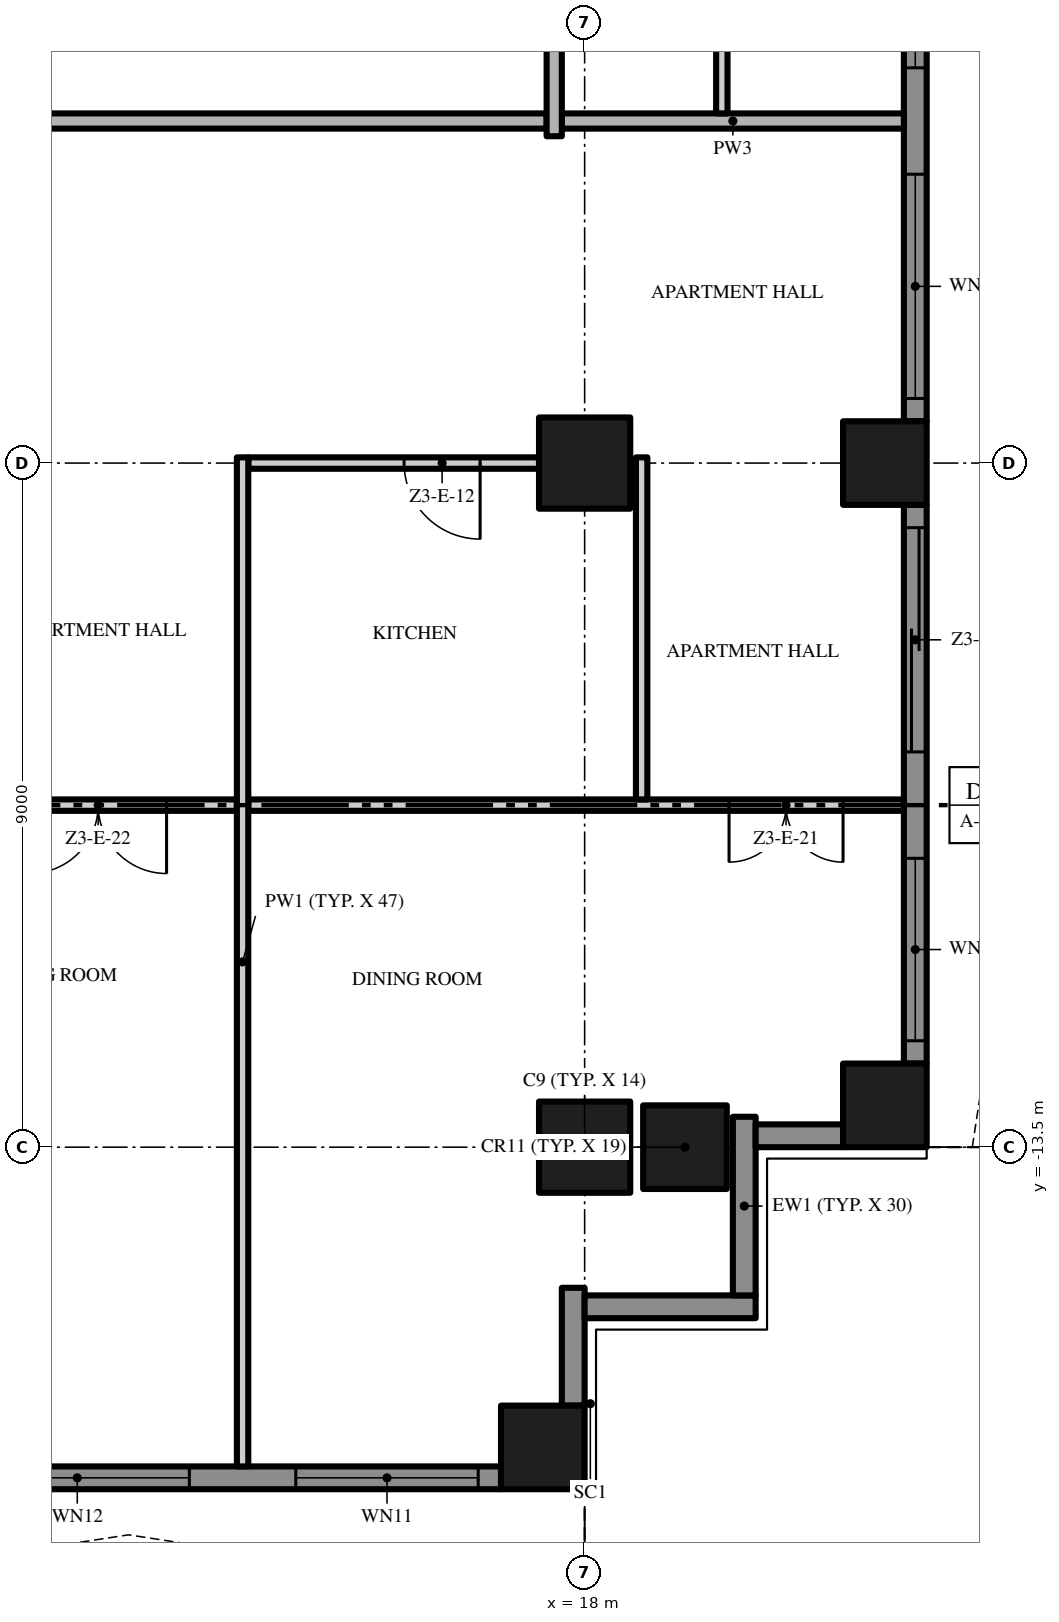
"""IFC4 building model, lengths in metres.
Left out: names, types, materials, properties, quantities, classifications, styles, units other than length and angle.
Written with IfcOpenShell. Run it as: python <this file> out.ifc"""

import sys

from ifc_helpers import new_model, si_unit, direction, frame, frame_2d, origin, origin_2d, place, context, subcontext, project, spatial, polyline, rectangle, outline, extrude, element, fill, save


model = new_model("IFC4")
c1 = context("Model", 3, precision=1e-05, world=origin(), true_north=direction((0.0, 1.0)))
c2 = subcontext(c1, "Body", "Model", "MODEL_VIEW")
j1 = project(units=[si_unit("LENGTHUNIT", "METRE"), si_unit("PLANEANGLEUNIT", "RADIAN")], contexts=[c1])
p1 = place(None, origin())
s1 = spatial("IfcSite", under=j1, at=p1, CompositionType="ELEMENT")
p2 = place(p1, origin())
s2 = spatial("IfcBuilding", under=s1, at=p2, CompositionType="ELEMENT")
p3 = place(p2, frame((0.0, 0.0, 166.8)))
s3 = spatial("IfcBuildingStorey", under=s2, at=p3, CompositionType="ELEMENT", Elevation=166.8)
p4 = place(p3, frame((18.0, -13.5, 0.0), z_axis=(0.0, 0.0, 1.0), x_axis=(1.0, 0.0, 0.0)))
e1 = element("IfcColumn", 1, at=p4, inside=s3, PredefinedType="COLUMN", context=c2, shape_type="SweptSolid", body=[
    extrude(rectangle(XDim=1.2, YDim=1.2, at=origin_2d()), origin(), (0.0, 0.0, 1.0), 3.5),
])
p5 = place(p3, frame((17.45, -17.45, 0.0), z_axis=(0.0, 0.0, 1.0), x_axis=(1.0, 0.0, 0.0)))
e2 = element("IfcColumn", 2, at=p5, inside=s3, PredefinedType="COLUMN", context=c2, shape_type="SweptSolid", body=[
    extrude(rectangle(XDim=1.1, YDim=1.1, at=origin_2d()), origin(), (0.0, 0.0, 1.0), 3.5),
])
p6 = place(p3, frame((18.0, -4.5, 0.0), z_axis=(0.0, 0.0, 1.0), x_axis=(1.0, 0.0, 0.0)))
e3 = element("IfcColumn", 3, at=p6, inside=s3, PredefinedType="COLUMN", context=c2, shape_type="SweptSolid", body=[
    extrude(rectangle(XDim=1.2, YDim=1.2, at=origin_2d()), origin(), (0.0, 0.0, 1.0), 3.5),
])
for number, where, z_axis, x_axis in (
    (4, (21.95, -12.95, 0.0), (0.0, 0.0, 1.0), (1.0, 0.0, 0.0)),
    (5, (19.32, -13.5, 0.0), (0.0, 0.0, 1.0), (1.0, 0.0, 0.0)),
    (6, (21.95, -4.5, 0.0), (0.0, 0.0, 1.0), (1.0, 0.0, 0.0)),
):
    element("IfcColumn", number, at=place(p3, frame(where, z_axis=z_axis, x_axis=x_axis)), inside=s3, PredefinedType="COLUMN", context=c2, shape_type="SweptSolid", body=[
        extrude(rectangle(XDim=1.1, YDim=1.1, at=origin_2d()), origin(), (0.0, 0.0, 1.0), 3.5),
    ])
p7 = place(p3, frame((16.9, -17.85, 0.0), z_axis=(0.0, 0.0, 1.0), x_axis=(-1.0, 0.0, 0.0)))
e7 = element("IfcWall", 7, at=p7, inside=s3, PredefinedType="SOLIDWALL", context=c2, shape_type="SweptSolid", body=[
    extrude(rectangle(XDim=7.35, YDim=0.3, at=frame_2d((3.675, 0.0))), origin(), (0.0, 0.0, 1.0), 3.5),
])
p8 = place(p7, frame((4.1, 0.0, 0.45)))
e8 = element("IfcOpeningElement", 8, at=p8, cuts=e7, PredefinedType="OPENING", context=c2, shape_type="SweptSolid", body=[
    extrude(rectangle(XDim=2.95, YDim=2.65, at=frame_2d((1.475, 1.325))), frame((0.0, 0.16, 0.0), z_axis=(0.0, -1.0, 0.0), x_axis=(1.0, 0.0, 0.0)), (0.0, 0.0, 1.0), 0.32),
])
p9 = place(p7, frame((0.3, 0.0, 0.45)))
e9 = element("IfcOpeningElement", 9, at=p9, cuts=e7, PredefinedType="OPENING", context=c2, shape_type="SweptSolid", body=[
    extrude(rectangle(XDim=2.4, YDim=2.65, at=frame_2d((1.2, 1.325))), frame((0.0, 0.16, 0.0), z_axis=(0.0, -1.0, 0.0), x_axis=(1.0, 0.0, 0.0)), (0.0, 0.0, 1.0), 0.32),
])
p10 = place(p3, frame((17.85, -15.35, 0.0), z_axis=(0.0, 0.0, 1.0), x_axis=(0.0, -1.0, 0.0)))
e10 = element("IfcWall", 10, at=p10, inside=s3, PredefinedType="SOLIDWALL", context=c2, shape_type="SweptSolid", body=[
    extrude(rectangle(XDim=1.55, YDim=0.3, at=frame_2d((0.775, 0.0))), origin(), (0.0, 0.0, 1.0), 3.5),
])
p11 = place(p3, frame((20.25, -15.6, 0.0), z_axis=(0.0, 0.0, 1.0), x_axis=(-1.0, 0.0, 0.0)))
e11 = element("IfcWall", 11, at=p11, inside=s3, PredefinedType="SOLIDWALL", context=c2, shape_type="SweptSolid", body=[
    extrude(rectangle(XDim=2.25, YDim=0.3, at=frame_2d((1.125, 0.0))), origin(), (0.0, 0.0, 1.0), 3.5),
])
p12 = place(p3, frame((20.1, -13.1, 0.0), z_axis=(0.0, 0.0, 1.0), x_axis=(0.0, -1.0, 0.0)))
e12 = element("IfcWall", 12, at=p12, inside=s3, PredefinedType="SOLIDWALL", context=c2, shape_type="SweptSolid", body=[
    extrude(rectangle(XDim=2.35, YDim=0.3, at=frame_2d((1.175, 0.0))), origin(), (0.0, 0.0, 1.0), 3.5),
])
p13 = place(p3, frame((21.4, -13.35, 0.0), z_axis=(0.0, 0.0, 1.0), x_axis=(-1.0, 0.0, 0.0)))
e13 = element("IfcWall", 13, at=p13, inside=s3, PredefinedType="SOLIDWALL", context=c2, shape_type="SweptSolid", body=[
    extrude(rectangle(XDim=1.15, YDim=0.3, at=frame_2d((0.575, 0.0))), origin(), (0.0, 0.0, 1.0), 3.5),
])
p14 = place(p3, frame((22.35, -5.05, 0.0), z_axis=(0.0, 0.0, 1.0), x_axis=(0.0, -1.0, 0.0)))
e14 = element("IfcWall", 14, at=p14, inside=s3, PredefinedType="SOLIDWALL", context=c2, shape_type="SweptSolid", body=[
    extrude(rectangle(XDim=7.35, YDim=0.3, at=frame_2d((3.675, 0.0))), origin(), (0.0, 0.0, 1.0), 3.5),
])
p15 = place(p14, frame((4.65, 0.0, 0.45)))
e15 = element("IfcOpeningElement", 15, at=p15, cuts=e14, PredefinedType="OPENING", context=c2, shape_type="SweptSolid", body=[
    extrude(rectangle(XDim=2.4, YDim=2.65, at=frame_2d((1.2, 1.325))), frame((0.0, 0.16, 0.0), z_axis=(0.0, -1.0, 0.0), x_axis=(1.0, 0.0, 0.0)), (0.0, 0.0, 1.0), 0.32),
])
p16 = place(p14, frame((0.3, 0.0, 0.0)))
e16 = element("IfcOpeningElement", 16, at=p16, cuts=e14, PredefinedType="OPENING", context=c2, shape_type="SweptSolid", body=[
    extrude(rectangle(XDim=2.95, YDim=2.4, at=frame_2d((1.475, 1.2))), frame((0.0, 0.16, 0.0), z_axis=(0.0, -1.0, 0.0), x_axis=(1.0, 0.0, 0.0)), (0.0, 0.0, 1.0), 0.32),
])
p17 = place(p3, frame((22.35, 3.95, 0.0), z_axis=(0.0, 0.0, 1.0), x_axis=(0.0, -1.0, 0.0)))
e17 = element("IfcWall", 17, at=p17, inside=s3, PredefinedType="SOLIDWALL", context=c2, shape_type="SweptSolid", body=[
    extrude(rectangle(XDim=7.9, YDim=0.3, at=frame_2d((3.95, 0.0))), origin(), (0.0, 0.0, 1.0), 3.5),
])
p18 = place(p17, frame((4.65, 0.0, 0.45)))
e18 = element("IfcOpeningElement", 18, at=p18, cuts=e17, PredefinedType="OPENING", context=c2, shape_type="SweptSolid", body=[
    extrude(rectangle(XDim=2.95, YDim=2.65, at=frame_2d((1.475, 1.325))), frame((0.0, 0.16, 0.0), z_axis=(0.0, -1.0, 0.0), x_axis=(1.0, 0.0, 0.0)), (0.0, 0.0, 1.0), 0.32),
])
p19 = place(p17, frame((0.3, 0.0, 0.45)))
e19 = element("IfcOpeningElement", 19, at=p19, cuts=e17, PredefinedType="OPENING", context=c2, shape_type="SweptSolid", body=[
    extrude(rectangle(XDim=2.95, YDim=2.65, at=frame_2d((1.475, 1.325))), frame((0.0, 0.16, 0.0), z_axis=(0.0, -1.0, 0.0), x_axis=(1.0, 0.0, 0.0)), (0.0, 0.0, 1.0), 0.32),
])
p20 = place(p3, origin())
e20 = element("IfcWall", 20, at=p20, inside=s3, PredefinedType="USERDEFINED", context=c2, shape_type="SweptSolid", body=[
    extrude(outline(polyline([(-18.0, -18.6), (-16.5, -18.829), (-15.0, -19.429), (-13.5, -20.171), (-12.0, -20.771), (-10.5, -21.0), (-9.0, -20.771), (-7.5, -20.171), (-6.0, -19.429), (-4.5, -18.829), (-3.0, -18.6), (-1.5, -18.829), (0.0, -19.429), (1.5, -20.171), (3.0, -20.771), (4.5, -21.0), (6.0, -20.771), (7.5, -20.171), (9.0, -19.429), (10.5, -18.829), (12.0, -18.6), (13.5, -18.829), (15.0, -19.429), (16.5, -20.171), (18.0, -20.771), (18.093, -20.539), (16.602, -19.942), (15.102, -19.201), (13.566, -18.586), (12.0, -18.347), (10.434, -18.586), (8.898, -19.201), (7.398, -19.942), (5.934, -20.528), (4.5, -20.747), (3.066, -20.528), (1.602, -19.942), (0.102, -19.201), (-1.434, -18.586), (-3.0, -18.347), (-4.566, -18.586), (-6.102, -19.201), (-7.602, -19.942), (-9.066, -20.528), (-10.5, -20.747), (-11.934, -20.528), (-13.398, -19.942), (-14.898, -19.201), (-16.434, -18.586), (-17.962, -18.353), (-18.0, -18.6)])), origin(), (0.0, 0.0, 1.0), 0.9),
])
p21 = place(p3, origin())
e21 = element("IfcWall", 21, at=p21, inside=s3, PredefinedType="USERDEFINED", context=c2, shape_type="SweptSolid", body=[
    extrude(outline(polyline([(23.1, -13.5), (23.329, -12.0), (23.929, -10.5), (24.671, -9.0), (25.271, -7.5), (25.5, -6.0), (25.271, -4.5), (24.671, -3.0), (23.929, -1.5), (23.329, 0.0), (23.1, 1.5), (23.329, 3.0), (23.929, 4.5), (24.671, 6.0), (25.271, 7.5), (25.5, 9.0), (25.271, 10.5), (24.671, 12.0), (23.929, 13.5), (23.329, 15.0), (23.1, 16.5), (23.329, 18.0), (23.082, 18.038), (22.847, 16.5), (23.086, 14.934), (23.701, 13.398), (24.442, 11.898), (25.028, 10.434), (25.247, 9.0), (25.028, 7.566), (24.442, 6.102), (23.701, 4.602), (23.086, 3.066), (22.847, 1.5), (23.086, -0.066), (23.701, -1.602), (24.442, -3.102), (25.028, -4.566), (25.247, -6.0), (25.028, -7.434), (24.442, -8.898), (23.701, -10.398), (23.086, -11.934), (22.853, -13.462), (23.1, -13.5)])), origin(), (0.0, 0.0, 1.0), 0.9),
])
p22 = place(p3, frame((13.425, -9.0, 0.0), z_axis=(0.0, 0.0, 1.0), x_axis=(-1.0, 0.0, 0.0)))
e22 = element("IfcWall", 22, at=p22, inside=s3, PredefinedType="PARTITIONING", context=c2, shape_type="SweptSolid", body=[
    extrude(rectangle(XDim=6.6, YDim=0.15, at=frame_2d((3.3, 0.0))), origin(), (0.0, 0.0, 1.0), 3.5),
])
p23 = place(p22, frame((0.925, 0.0, 0.0)))
e23 = element("IfcOpeningElement", 23, at=p23, cuts=e22, PredefinedType="OPENING", context=c2, shape_type="SweptSolid", body=[
    extrude(rectangle(XDim=1.8, YDim=2.4, at=frame_2d((0.9, 1.2))), frame((0.0, 0.085, 0.0), z_axis=(0.0, -1.0, 0.0), x_axis=(1.0, 0.0, 0.0)), (0.0, 0.0, 1.0), 0.17),
])
p24 = place(p3, frame((22.2, -9.0, 0.0), z_axis=(0.0, 0.0, 1.0), x_axis=(-1.0, 0.0, 0.0)))
e24 = element("IfcWall", 24, at=p24, inside=s3, PredefinedType="PARTITIONING", context=c2, shape_type="SweptSolid", body=[
    extrude(rectangle(XDim=8.625, YDim=0.15, at=frame_2d((4.312, 0.0))), origin(), (0.0, 0.0, 1.0), 3.5),
])
p25 = place(p24, frame((0.8, 0.0, 0.0)))
e25 = element("IfcOpeningElement", 25, at=p25, cuts=e24, PredefinedType="OPENING", context=c2, shape_type="SweptSolid", body=[
    extrude(rectangle(XDim=1.5, YDim=2.4, at=frame_2d((0.75, 1.2))), frame((0.0, 0.085, 0.0), z_axis=(0.0, -1.0, 0.0), x_axis=(1.0, 0.0, 0.0)), (0.0, 0.0, 1.0), 0.17),
])
p26 = place(p3, frame((17.4, -4.5, 0.0), z_axis=(0.0, 0.0, 1.0), x_axis=(-1.0, 0.0, 0.0)))
e26 = element("IfcWall", 26, at=p26, inside=s3, PredefinedType="PARTITIONING", context=c2, shape_type="SweptSolid", body=[
    extrude(rectangle(XDim=3.825, YDim=0.15, at=frame_2d((1.913, 0.0))), origin(), (0.0, 0.0, 1.0), 3.5),
])
p27 = place(p26, frame((0.775, 0.0, 0.0)))
e27 = element("IfcOpeningElement", 27, at=p27, cuts=e26, PredefinedType="OPENING", context=c2, shape_type="SweptSolid", body=[
    extrude(rectangle(XDim=1.0, YDim=2.4, at=frame_2d((0.5, 1.2))), frame((0.0, 0.085, 0.0), z_axis=(0.0, -1.0, 0.0), x_axis=(1.0, 0.0, 0.0)), (0.0, 0.0, 1.0), 0.17),
])
p28 = place(p3, frame((17.5, 0.0, 0.0), z_axis=(0.0, 0.0, 1.0), x_axis=(-1.0, 0.0, 0.0)))
e28 = element("IfcWall", 28, at=p28, inside=s3, PredefinedType="PARTITIONING", context=c2, shape_type="SweptSolid", body=[
    extrude(rectangle(XDim=35.0, YDim=0.2, at=frame_2d((17.5, 0.0))), origin(), (0.0, 0.0, 1.0), 3.5),
])
p29 = place(p28, frame((16.75, 0.0, 0.0)))
e29 = element("IfcOpeningElement", 29, at=p29, cuts=e28, PredefinedType="OPENING", context=c2, shape_type="SweptSolid", body=[
    extrude(rectangle(XDim=1.5, YDim=2.4, at=frame_2d((0.75, 1.2))), frame((0.0, 0.11, 0.0), z_axis=(0.0, -1.0, 0.0), x_axis=(1.0, 0.0, 0.0)), (0.0, 0.0, 1.0), 0.22),
])
p30 = place(p3, frame((17.7, 0.0, 0.0), z_axis=(0.0, 0.0, 1.0), x_axis=(1.0, 0.0, 0.0)))
e30 = element("IfcWall", 30, at=p30, inside=s3, PredefinedType="PARTITIONING", context=c2, shape_type="SweptSolid", body=[
    extrude(rectangle(XDim=4.5, YDim=0.2, at=frame_2d((2.25, 0.0))), origin(), (0.0, 0.0, 1.0), 3.5),
])
p31 = place(p3, frame((13.5, -17.7, 0.0), z_axis=(0.0, 0.0, 1.0), x_axis=(0.0, 1.0, 0.0)))
e31 = element("IfcWall", 31, at=p31, inside=s3, PredefinedType="PARTITIONING", context=c2, shape_type="SweptSolid", body=[
    extrude(rectangle(XDim=13.275, YDim=0.15, at=frame_2d((6.638, 0.0))), origin(), (0.0, 0.0, 1.0), 3.5),
])
p32 = place(p3, frame((17.6, -0.2, 0.0), z_axis=(0.0, 0.0, 1.0), x_axis=(0.0, 1.0, 0.0)))
e32 = element("IfcWall", 32, at=p32, inside=s3, PredefinedType="PARTITIONING", context=c2, shape_type="SweptSolid", body=[
    extrude(rectangle(XDim=4.1, YDim=0.2, at=frame_2d((2.05, 0.0))), origin(), (0.0, 0.0, 1.0), 3.5),
])
p33 = place(p3, frame((18.75, -8.925, 0.0), z_axis=(0.0, 0.0, 1.0), x_axis=(0.0, 1.0, 0.0)))
e33 = element("IfcWall", 33, at=p33, inside=s3, PredefinedType="PARTITIONING", context=c2, shape_type="SweptSolid", body=[
    extrude(rectangle(XDim=4.5, YDim=0.15, at=frame_2d((2.25, 0.0))), origin(), (0.0, 0.0, 1.0), 3.5),
])
p34 = place(p3, frame((19.805, 0.1, 0.0), z_axis=(0.0, 0.0, 1.0), x_axis=(0.0, 1.0, 0.0)))
e34 = element("IfcWall", 34, at=p34, inside=s3, PredefinedType="PARTITIONING", context=c2, shape_type="SweptSolid", body=[
    extrude(rectangle(XDim=2.225, YDim=0.15, at=frame_2d((1.113, 0.0))), origin(), (0.0, 0.0, 1.0), 3.5),
])
p35 = place(p8, origin())
e35 = element("IfcWindow", 35, at=p35, inside=s3, PartitioningType="SINGLE_PANEL", PredefinedType="WINDOW", context=c2, shape_type="SweptSolid", body=[
    extrude(rectangle(XDim=2.95, YDim=2.65, at=frame_2d((1.475, 1.325))), frame((0.0, 0.03, 0.0), z_axis=(0.0, -1.0, 0.0), x_axis=(1.0, 0.0, 0.0)), (0.0, 0.0, 1.0), 0.06),
])
fill(e8, e35)
p36 = place(p9, origin())
e36 = element("IfcWindow", 36, at=p36, inside=s3, PartitioningType="SINGLE_PANEL", PredefinedType="WINDOW", context=c2, shape_type="SweptSolid", body=[
    extrude(rectangle(XDim=2.4, YDim=2.65, at=frame_2d((1.2, 1.325))), frame((0.0, 0.03, 0.0), z_axis=(0.0, -1.0, 0.0), x_axis=(1.0, 0.0, 0.0)), (0.0, 0.0, 1.0), 0.06),
])
fill(e9, e36)
p37 = place(p15, origin())
e37 = element("IfcWindow", 37, at=p37, inside=s3, PartitioningType="SINGLE_PANEL", PredefinedType="WINDOW", context=c2, shape_type="SweptSolid", body=[
    extrude(rectangle(XDim=2.4, YDim=2.65, at=frame_2d((1.2, 1.325))), frame((0.0, 0.03, 0.0), z_axis=(0.0, -1.0, 0.0), x_axis=(1.0, 0.0, 0.0)), (0.0, 0.0, 1.0), 0.06),
])
fill(e15, e37)
p38 = place(p16, origin())
e38 = element("IfcDoor", 38, at=p38, inside=s3, OperationType="SINGLE_SWING_LEFT", PredefinedType="DOOR", context=c2, shape_type="SweptSolid", body=[
    extrude(rectangle(XDim=2.95, YDim=2.4, at=frame_2d((1.475, 1.2))), frame((0.0, 0.025, 0.0), z_axis=(0.0, -1.0, 0.0), x_axis=(1.0, 0.0, 0.0)), (0.0, 0.0, 1.0), 0.05),
])
fill(e16, e38)
p39 = place(p18, origin())
e39 = element("IfcWindow", 39, at=p39, inside=s3, PartitioningType="SINGLE_PANEL", PredefinedType="WINDOW", context=c2, shape_type="SweptSolid", body=[
    extrude(rectangle(XDim=2.95, YDim=2.65, at=frame_2d((1.475, 1.325))), frame((0.0, 0.03, 0.0), z_axis=(0.0, -1.0, 0.0), x_axis=(1.0, 0.0, 0.0)), (0.0, 0.0, 1.0), 0.06),
])
fill(e18, e39)
p40 = place(p19, origin())
e40 = element("IfcWindow", 40, at=p40, inside=s3, PartitioningType="SINGLE_PANEL", PredefinedType="WINDOW", context=c2, shape_type="SweptSolid", body=[
    extrude(rectangle(XDim=2.95, YDim=2.65, at=frame_2d((1.475, 1.325))), frame((0.0, 0.03, 0.0), z_axis=(0.0, -1.0, 0.0), x_axis=(1.0, 0.0, 0.0)), (0.0, 0.0, 1.0), 0.06),
])
fill(e19, e40)
p41 = place(p27, origin())
e41 = element("IfcDoor", 41, at=p41, inside=s3, OperationType="SINGLE_SWING_LEFT", PredefinedType="DOOR", context=c2, shape_type="SweptSolid", body=[
    extrude(rectangle(XDim=1.0, YDim=2.4, at=frame_2d((0.5, 1.2))), frame((0.0, 0.025, 0.0), z_axis=(0.0, -1.0, 0.0), x_axis=(1.0, 0.0, 0.0)), (0.0, 0.0, 1.0), 0.05),
])
fill(e27, e41)
p42 = place(p25, origin())
e42 = element("IfcDoor", 42, at=p42, inside=s3, OperationType="DOUBLE_DOOR_SINGLE_SWING", PredefinedType="DOOR", context=c2, shape_type="SweptSolid", body=[
    extrude(rectangle(XDim=1.5, YDim=2.4, at=frame_2d((0.75, 1.2))), frame((0.0, 0.025, 0.0), z_axis=(0.0, -1.0, 0.0), x_axis=(1.0, 0.0, 0.0)), (0.0, 0.0, 1.0), 0.05),
])
fill(e25, e42)
p43 = place(p23, origin())
e43 = element("IfcDoor", 43, at=p43, inside=s3, OperationType="DOUBLE_DOOR_SINGLE_SWING", PredefinedType="DOOR", context=c2, shape_type="SweptSolid", body=[
    extrude(rectangle(XDim=1.8, YDim=2.4, at=frame_2d((0.9, 1.2))), frame((0.0, 0.025, 0.0), z_axis=(0.0, -1.0, 0.0), x_axis=(1.0, 0.0, 0.0)), (0.0, 0.0, 1.0), 0.05),
])
fill(e23, e43)
save(model, sys.argv[1])
